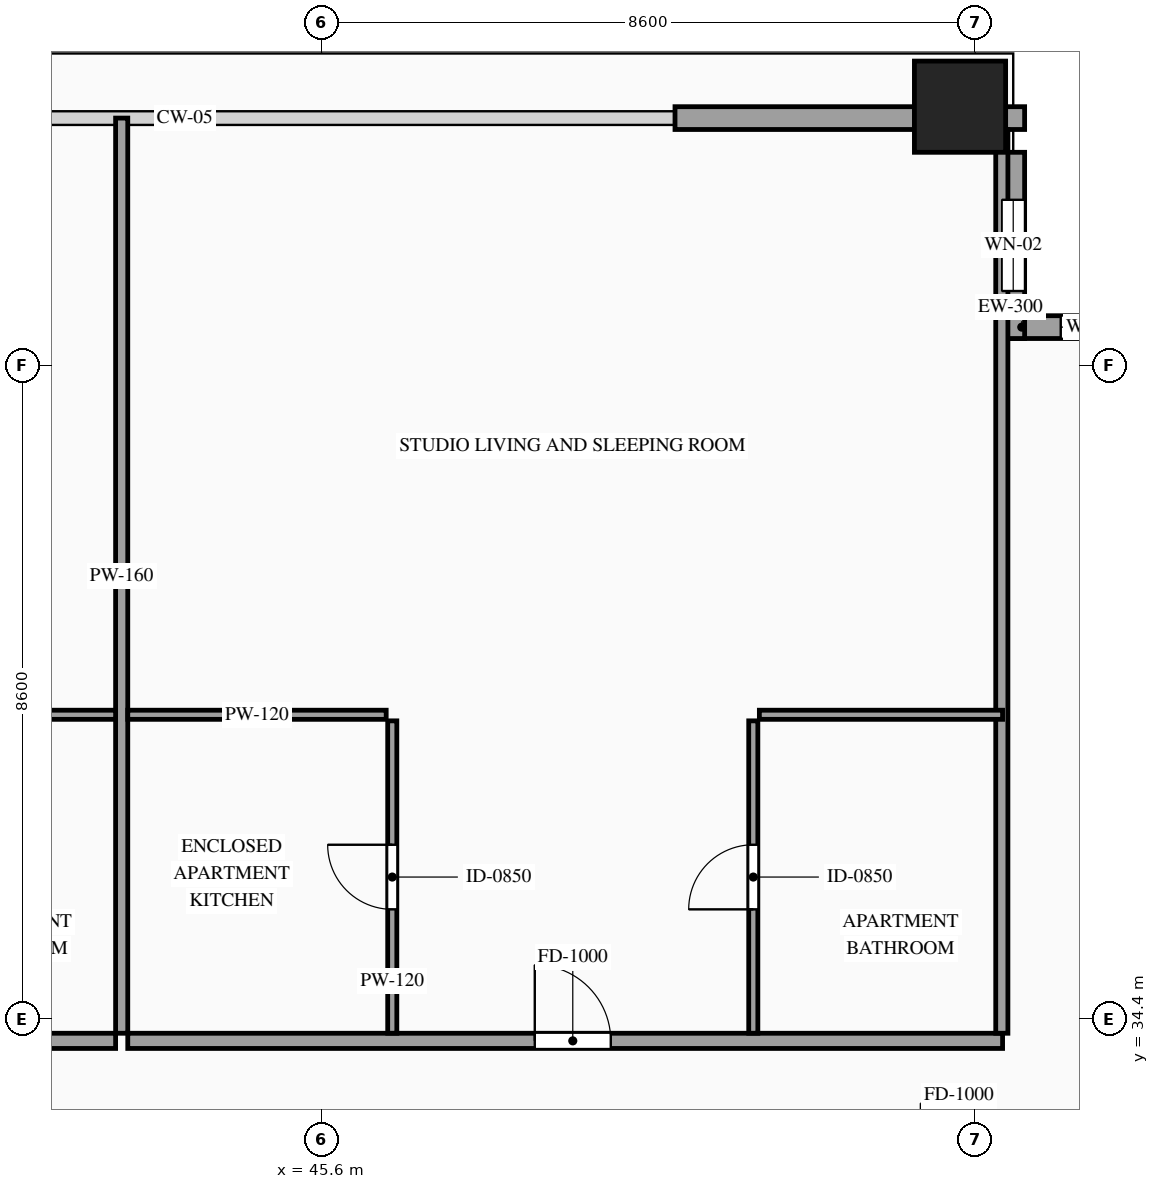
"""IFC4 building model, lengths in metres.
Left out: names, types, materials, properties, quantities, classifications, styles, units other than length and angle.
Written with IfcOpenShell. Run it as: python <this file> out.ifc"""

import sys

from ifc_helpers import new_model, si_unit, direction, frame, frame_2d, origin, origin_2d, place, context, subcontext, project, spatial, rectangle, hollow_rectangle, extrude, source, transform, mapped, element, fill, save


model = new_model("IFC4")
c1 = context("Model", 3, precision=1e-05, world=origin(), true_north=direction((0.0, 1.0)))
c2 = subcontext(c1, "Body", "Model", "MODEL_VIEW")
j1 = project(units=[si_unit("LENGTHUNIT", "METRE"), si_unit("PLANEANGLEUNIT", "RADIAN")], contexts=[c1])
p1 = place(None, origin())
s1 = spatial("IfcSite", under=j1, at=p1, CompositionType="ELEMENT")
p2 = place(p1, origin())
s2 = spatial("IfcBuilding", under=s1, at=p2, CompositionType="ELEMENT")
p3 = place(p2, frame((0.0, 0.0, 234.6)))
s3 = spatial("IfcBuildingStorey", under=s2, at=p3, CompositionType="ELEMENT", Elevation=234.6)
m1 = source(origin(), c2, "Body", "SweptSolid", [
    extrude(hollow_rectangle(XDim=1.2, YDim=1.2, WallThickness=0.055, at=origin_2d()), origin(), (0.0, 0.0, 1.0), 3.5),
])
p4 = place(p3, frame((54.0, 46.4, 0.0), z_axis=(0.0, 0.0, 1.0), x_axis=(1.0, 0.0, 0.0)))
e1 = element("IfcColumn", 1, at=p4, inside=s3, PredefinedType="COLUMN", context=c2, shape_type="MappedRepresentation", body=[
    mapped(m1, transform((0.0, 0.0, 0.0), scale=1.0)),
])
p5 = place(p3, frame((57.0, 43.5, 0.0), z_axis=(0.0, 0.0, 1.0), x_axis=(-1.0, 0.0, 0.0)))
e2 = element("IfcWall", 2, at=p5, inside=s3, PredefinedType="SOLIDWALL", context=c2, shape_type="SweptSolid", body=[
    extrude(rectangle(XDim=2.45, YDim=0.3, at=frame_2d((1.225, 0.0))), origin(), (0.0, 0.0, 1.0), 3.28),
])
p6 = place(p5, frame((0.775, 0.0, 0.85)))
e3 = element("IfcOpeningElement", 3, at=p6, cuts=e2, PredefinedType="OPENING", context=c2, shape_type="SweptSolid", body=[
    extrude(rectangle(XDim=0.9, YDim=1.5, at=frame_2d((0.45, 0.75))), frame((0.0, 0.165, 0.0), z_axis=(0.0, -1.0, 0.0), x_axis=(1.0, 0.0, 0.0)), (0.0, 0.0, 1.0), 0.33),
])
p7 = place(p3, frame((54.7, 43.35, 0.0), z_axis=(0.0, 0.0, 1.0), x_axis=(0.0, 1.0, 0.0)))
e4 = element("IfcWall", 4, at=p7, inside=s3, PredefinedType="SOLIDWALL", context=c2, shape_type="SweptSolid", body=[
    extrude(rectangle(XDim=2.45, YDim=0.3, at=frame_2d((1.225, 0.0))), origin(), (0.0, 0.0, 1.0), 3.28),
])
p8 = place(p7, frame((0.625, 0.0, 0.85)))
e5 = element("IfcOpeningElement", 5, at=p8, cuts=e4, PredefinedType="OPENING", context=c2, shape_type="SweptSolid", body=[
    extrude(rectangle(XDim=1.2, YDim=2.1, at=frame_2d((0.6, 1.05))), frame((0.0, 0.165, 0.0), z_axis=(0.0, -1.0, 0.0), x_axis=(1.0, 0.0, 0.0)), (0.0, 0.0, 1.0), 0.33),
])
m2 = source(origin(), c2, "Body", "SweptSolid", [
    extrude(rectangle(XDim=0.25, YDim=0.3, at=frame_2d((0.125, 0.0))), origin(), (0.0, 0.0, 1.0), 3.28),
])
p9 = place(p3, frame((54.6, 46.25, 0.0), z_axis=(0.0, 0.0, 1.0), x_axis=(1.0, 0.0, 0.0)))
e6 = element("IfcWall", 6, at=p9, inside=s3, PredefinedType="SOLIDWALL", context=c2, shape_type="MappedRepresentation", body=[
    mapped(m2, transform((0.0, 0.0, 0.0), scale=1.0)),
])
m3 = source(origin(), c2, "Body", "SweptSolid", [
    extrude(rectangle(XDim=3.15, YDim=0.3, at=frame_2d((1.575, 0.0))), origin(), (0.0, 0.0, 1.0), 2.835),
])
p10 = place(p3, frame((50.25, 46.25, 0.0), z_axis=(0.0, 0.0, 1.0), x_axis=(1.0, 0.0, 0.0)))
e7 = element("IfcWall", 7, at=p10, inside=s3, PredefinedType="SOLIDWALL", context=c2, shape_type="MappedRepresentation", body=[
    mapped(m3, transform((0.0, 0.0, 0.0), scale=1.0)),
])
p11 = place(p3, frame((31.461, 34.11, 0.0), z_axis=(0.0, 0.0, 1.0), x_axis=(1.0, 0.0, 0.0)))
e8 = element("IfcWall", 8, at=p11, inside=s3, PredefinedType="PARTITIONING", context=c2, shape_type="SweptSolid", body=[
    extrude(rectangle(XDim=11.429, YDim=0.2, at=frame_2d((5.714, 0.0))), origin(), (0.0, 0.0, 1.0), 3.28),
])
p12 = place(p11, frame((5.314, 0.0, 0.0)))
e9 = element("IfcOpeningElement", 9, at=p12, cuts=e8, PredefinedType="OPENING", context=c2, shape_type="SweptSolid", body=[
    extrude(rectangle(XDim=1.0, YDim=2.2, at=frame_2d((0.5, 1.1))), frame((0.0, 0.115, 0.0), z_axis=(0.0, -1.0, 0.0), x_axis=(1.0, 0.0, 0.0)), (0.0, 0.0, 1.0), 0.23),
])
m4 = source(origin(), c2, "Body", "SweptSolid", [
    extrude(rectangle(XDim=12.04, YDim=0.16, at=frame_2d((6.02, 0.0))), origin(), (0.0, 0.0, 1.0), 3.28),
])
p13 = place(p3, frame((42.97, 34.21, 0.0), z_axis=(0.0, 0.0, 1.0), x_axis=(0.0, 1.0, 0.0)))
e10 = element("IfcWall", 10, at=p13, inside=s3, PredefinedType="PARTITIONING", context=c2, shape_type="MappedRepresentation", body=[
    mapped(m4, transform((0.0, 0.0, 0.0), scale=1.0)),
])
m5 = source(origin(), c2, "Body", "SweptSolid", [
    extrude(rectangle(XDim=3.2, YDim=0.12, at=frame_2d((1.6, 0.0))), origin(), (0.0, 0.0, 1.0), 3.28),
])
p14 = place(p3, frame((39.69, 38.4, 0.0), z_axis=(0.0, 0.0, 1.0), x_axis=(1.0, 0.0, 0.0)))
e11 = element("IfcWall", 11, at=p14, inside=s3, PredefinedType="PARTITIONING", context=c2, shape_type="MappedRepresentation", body=[
    mapped(m5, transform((0.0, 0.0, 0.0), scale=1.0)),
])
p15 = place(p3, frame((43.05, 34.11, 0.0), z_axis=(0.0, 0.0, 1.0), x_axis=(1.0, 0.0, 0.0)))
e12 = element("IfcWall", 12, at=p15, inside=s3, PredefinedType="PARTITIONING", context=c2, shape_type="SweptSolid", body=[
    extrude(rectangle(XDim=11.51, YDim=0.2, at=frame_2d((5.755, 0.0))), origin(), (0.0, 0.0, 1.0), 3.28),
])
p16 = place(p15, frame((5.355, 0.0, 0.0)))
e13 = element("IfcOpeningElement", 13, at=p16, cuts=e12, PredefinedType="OPENING", context=c2, shape_type="SweptSolid", body=[
    extrude(rectangle(XDim=1.0, YDim=2.2, at=frame_2d((0.5, 1.1))), frame((0.0, 0.115, 0.0), z_axis=(0.0, -1.0, 0.0), x_axis=(1.0, 0.0, 0.0)), (0.0, 0.0, 1.0), 0.23),
])
m6 = source(origin(), c2, "Body", "SweptSolid", [
    extrude(rectangle(XDim=11.89, YDim=0.16, at=frame_2d((5.945, 0.0))), origin(), (0.0, 0.0, 1.0), 3.28),
])
p17 = place(p3, frame((54.55, 34.21, 0.0), z_axis=(0.0, 0.0, 1.0), x_axis=(0.0, 1.0, 0.0)))
e14 = element("IfcWall", 14, at=p17, inside=s3, PredefinedType="PARTITIONING", context=c2, shape_type="MappedRepresentation", body=[
    mapped(m6, transform((0.0, 0.0, 0.0), scale=1.0)),
])
m7 = source(origin(), c2, "Body", "SweptSolid", [
    extrude(rectangle(XDim=3.4, YDim=0.12, at=frame_2d((1.7, 0.0))), origin(), (0.0, 0.0, 1.0), 3.28),
])
p18 = place(p3, frame((43.05, 38.4, 0.0), z_axis=(0.0, 0.0, 1.0), x_axis=(1.0, 0.0, 0.0)))
e15 = element("IfcWall", 15, at=p18, inside=s3, PredefinedType="PARTITIONING", context=c2, shape_type="MappedRepresentation", body=[
    mapped(m7, transform((0.0, 0.0, 0.0), scale=1.0)),
])
p19 = place(p3, frame((46.53, 34.21, 0.0), z_axis=(0.0, 0.0, 1.0), x_axis=(0.0, 1.0, 0.0)))
e16 = element("IfcWall", 16, at=p19, inside=s3, PredefinedType="PARTITIONING", context=c2, shape_type="SweptSolid", body=[
    extrude(rectangle(XDim=4.11, YDim=0.12, at=frame_2d((2.055, 0.0))), origin(), (0.0, 0.0, 1.0), 3.28),
])
p20 = place(p19, frame((1.63, 0.0, 0.0)))
e17 = element("IfcOpeningElement", 17, at=p20, cuts=e16, PredefinedType="OPENING", context=c2, shape_type="SweptSolid", body=[
    extrude(rectangle(XDim=0.85, YDim=2.1, at=frame_2d((0.425, 1.05))), frame((0.0, 0.075, 0.0), z_axis=(0.0, -1.0, 0.0), x_axis=(1.0, 0.0, 0.0)), (0.0, 0.0, 1.0), 0.15),
])
p21 = place(p3, frame((51.36, 38.4, 0.0), z_axis=(0.0, 0.0, 1.0), x_axis=(1.0, 0.0, 0.0)))
e18 = element("IfcWall", 18, at=p21, inside=s3, PredefinedType="PARTITIONING", context=c2, shape_type="MappedRepresentation", body=[
    mapped(m5, transform((0.0, 0.0, 0.0), scale=1.0)),
])
p22 = place(p3, frame((51.28, 34.21, 0.0), z_axis=(0.0, 0.0, 1.0), x_axis=(0.0, 1.0, 0.0)))
e19 = element("IfcWall", 19, at=p22, inside=s3, PredefinedType="PARTITIONING", context=c2, shape_type="SweptSolid", body=[
    extrude(rectangle(XDim=4.11, YDim=0.12, at=frame_2d((2.055, 0.0))), origin(), (0.0, 0.0, 1.0), 3.28),
])
p23 = place(p22, frame((1.63, 0.0, 0.0)))
e20 = element("IfcOpeningElement", 20, at=p23, cuts=e19, PredefinedType="OPENING", context=c2, shape_type="SweptSolid", body=[
    extrude(rectangle(XDim=0.85, YDim=2.1, at=frame_2d((0.425, 1.05))), frame((0.0, 0.075, 0.0), z_axis=(0.0, -1.0, 0.0), x_axis=(1.0, 0.0, 0.0)), (0.0, 0.0, 1.0), 0.15),
])
m8 = source(origin(), c2, "Body", "SweptSolid", [
    extrude(rectangle(XDim=0.9, YDim=1.5, at=frame_2d((0.45, 0.75))), frame((0.0, 0.03, 0.0), z_axis=(0.0, -1.0, 0.0), x_axis=(1.0, 0.0, 0.0)), (0.0, 0.0, 1.0), 0.06),
])
p24 = place(p6, origin())
e21 = element("IfcWindow", 21, at=p24, inside=s3, PartitioningType="SINGLE_PANEL", PredefinedType="WINDOW", context=c2, shape_type="MappedRepresentation", body=[
    mapped(m8, transform((0.0, 0.0, 0.0), scale=1.0)),
])
fill(e3, e21)
m9 = source(origin(), c2, "Body", "SweptSolid", [
    extrude(rectangle(XDim=1.2, YDim=2.1, at=frame_2d((0.6, 1.05))), frame((0.0, 0.03, 0.0), z_axis=(0.0, -1.0, 0.0), x_axis=(1.0, 0.0, 0.0)), (0.0, 0.0, 1.0), 0.06),
])
p25 = place(p8, origin())
e22 = element("IfcWindow", 22, at=p25, inside=s3, PartitioningType="SINGLE_PANEL", PredefinedType="WINDOW", context=c2, shape_type="MappedRepresentation", body=[
    mapped(m9, transform((0.0, 0.0, 0.0), scale=1.0)),
])
fill(e5, e22)
m10 = source(origin(), c2, "Body", "SweptSolid", [
    extrude(rectangle(XDim=1.0, YDim=2.2, at=frame_2d((0.5, 1.1))), frame((0.0, 0.025, 0.0), z_axis=(0.0, -1.0, 0.0), x_axis=(1.0, 0.0, 0.0)), (0.0, 0.0, 1.0), 0.05),
])
p26 = place(p16, origin())
e23 = element("IfcDoor", 23, at=p26, inside=s3, OperationType="SINGLE_SWING_LEFT", PredefinedType="DOOR", context=c2, shape_type="MappedRepresentation", body=[
    mapped(m10, transform((0.0, 0.0, 0.0), scale=1.0)),
])
fill(e13, e23)
m11 = source(origin(), c2, "Body", "SweptSolid", [
    extrude(rectangle(XDim=0.85, YDim=2.1, at=frame_2d((0.425, 1.05))), frame((0.0, 0.025, 0.0), z_axis=(0.0, -1.0, 0.0), x_axis=(1.0, 0.0, 0.0)), (0.0, 0.0, 1.0), 0.05),
])
p27 = place(p20, origin())
e24 = element("IfcDoor", 24, at=p27, inside=s3, OperationType="SINGLE_SWING_RIGHT", PredefinedType="DOOR", context=c2, shape_type="MappedRepresentation", body=[
    mapped(m11, transform((0.0, 0.0, 0.0), scale=1.0)),
])
fill(e17, e24)
p28 = place(p23, origin())
e25 = element("IfcDoor", 25, at=p28, inside=s3, OperationType="SINGLE_SWING_LEFT", PredefinedType="DOOR", context=c2, shape_type="MappedRepresentation", body=[
    mapped(m11, transform((0.0, 0.0, 0.0), scale=1.0)),
])
fill(e20, e25)
save(model, sys.argv[1])
